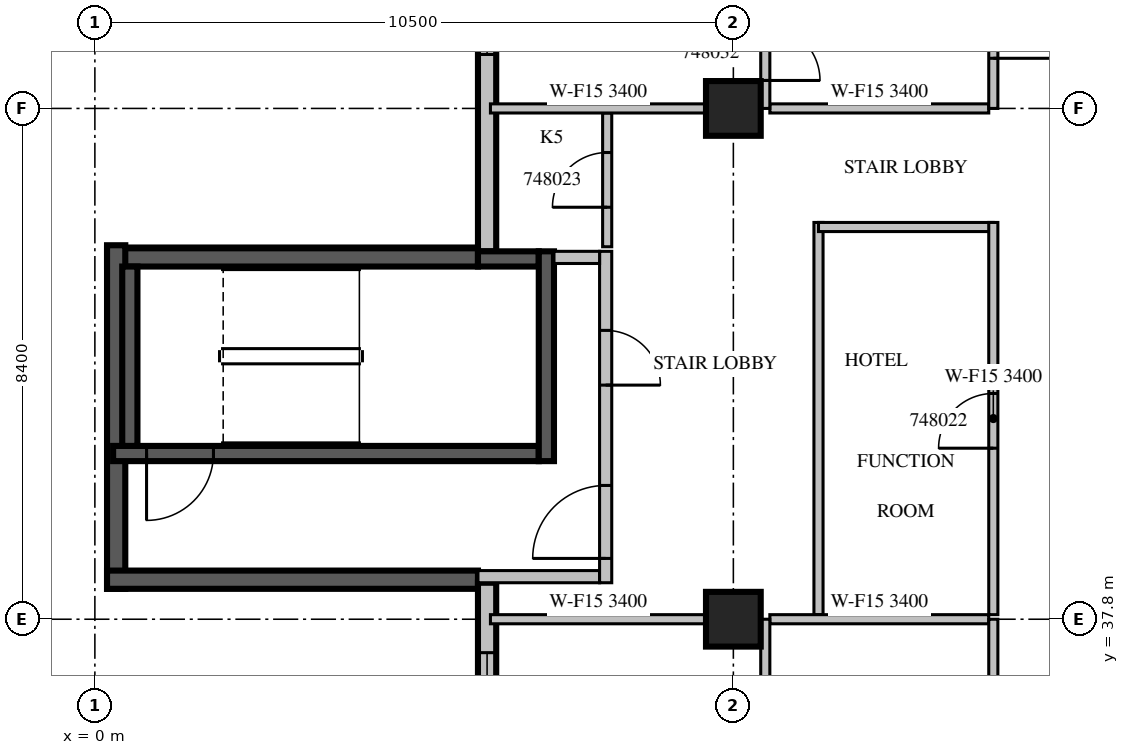
"""IFC4 building model, lengths in metres.
Left out: names, types, materials, properties, quantities, classifications, styles, units other than length and angle.
Written with IfcOpenShell. Run it as: python <this file> out.ifc"""

import sys

from ifc_helpers import new_model, si_unit, direction, frame, frame_2d, origin, origin_2d, place, context, subcontext, project, spatial, rectangle, extrude, source, transform, mapped, element, fill, save


model = new_model("IFC4")
c1 = context("Model", 3, precision=1e-05, world=origin(), true_north=direction((0.0, 1.0)))
c2 = subcontext(c1, "Body", "Model", "MODEL_VIEW")
j1 = project(units=[si_unit("LENGTHUNIT", "METRE"), si_unit("PLANEANGLEUNIT", "RADIAN")], contexts=[c1])
p1 = place(None, origin())
s1 = spatial("IfcSite", under=j1, at=p1, CompositionType="ELEMENT")
p2 = place(p1, origin())
s2 = spatial("IfcBuilding", under=s1, at=p2, CompositionType="ELEMENT")
p3 = place(p2, frame((0.0, 0.0, 215.8)))
s3 = spatial("IfcBuildingStorey", under=s2, at=p3, CompositionType="ELEMENT", Elevation=215.8)
m1 = source(origin(), c2, "Body", "SweptSolid", [
    extrude(rectangle(XDim=0.9, YDim=0.9, at=origin_2d()), origin(), (0.0, 0.0, 1.0), 3.8),
])
for number, where, z_axis, x_axis in (
    (1, (10.5, 37.8, 0.0), (0.0, 0.0, 1.0), (1.0, 0.0, 0.0)),
    (2, (10.5, 46.2, 0.0), (0.0, 0.0, 1.0), (1.0, 0.0, 0.0)),
):
    element("IfcColumn", number, at=place(p3, frame(where, z_axis=z_axis, x_axis=x_axis)), inside=s3, PredefinedType="COLUMN", context=c2, shape_type="MappedRepresentation", body=[
        mapped(m1, transform((0.0, 0.0, 0.0), scale=1.0)),
    ])
m2 = source(origin(), c2, "Body", "SweptSolid", [
    extrude(rectangle(XDim=9.91, YDim=0.3, at=frame_2d((4.955, 0.0))), origin(), (0.0, 0.0, 1.0), 3.4),
])
p4 = place(p3, frame((6.45, 53.76, 0.0), z_axis=(0.0, 0.0, 1.0), x_axis=(0.0, -1.0, 0.0)))
e3 = element("IfcWall", 3, at=p4, inside=s3, PredefinedType="STANDARD", context=c2, shape_type="MappedRepresentation", body=[
    mapped(m2, transform((0.0, 0.0, 0.0), scale=1.0)),
])
m3 = source(origin(), c2, "Body", "SweptSolid", [
    extrude(rectangle(XDim=2.4, YDim=2.3, at=frame_2d((1.2, 1.15))), frame((0.0, 0.16, 0.0), z_axis=(0.0, -1.0, 0.0), x_axis=(1.0, 0.0, 0.0)), (0.0, 0.0, 1.0), 0.32),
])
p5 = place(p4, frame((4.272, 0.0, 0.6)))
e4 = element("IfcOpeningElement", 4, at=p5, cuts=e3, PredefinedType="OPENING", context=c2, shape_type="MappedRepresentation", body=[
    mapped(m3, transform((0.0, 0.0, 0.0), scale=1.0)),
])
p6 = place(p4, frame((0.936, 0.0, 0.6)))
e5 = element("IfcOpeningElement", 5, at=p6, cuts=e3, PredefinedType="OPENING", context=c2, shape_type="MappedRepresentation", body=[
    mapped(m3, transform((0.0, 0.0, 0.0), scale=1.0)),
])
m4 = source(origin(), c2, "Body", "SweptSolid", [
    extrude(rectangle(XDim=6.1, YDim=0.3, at=frame_2d((3.05, 0.0))), origin(), (0.0, 0.0, 1.0), 3.4),
])
p7 = place(p3, frame((6.3, 43.75, 0.0), z_axis=(0.0, 0.0, 1.0), x_axis=(-1.0, 0.0, 0.0)))
e6 = element("IfcWall", 6, at=p7, inside=s3, PredefinedType="SOLIDWALL", context=c2, shape_type="MappedRepresentation", body=[
    mapped(m4, transform((0.0, 0.0, 0.0), scale=1.0)),
])
m5 = source(origin(), c2, "Body", "SweptSolid", [
    extrude(rectangle(XDim=5.65, YDim=0.3, at=frame_2d((2.825, 0.0))), origin(), (0.0, 0.0, 1.0), 3.4),
])
p8 = place(p3, frame((0.35, 43.95, 0.0), z_axis=(0.0, 0.0, 1.0), x_axis=(0.0, -1.0, 0.0)))
e7 = element("IfcWall", 7, at=p8, inside=s3, PredefinedType="SOLIDWALL", context=c2, shape_type="MappedRepresentation", body=[
    mapped(m5, transform((0.0, 0.0, 0.0), scale=1.0)),
])
p9 = place(p3, frame((0.2, 38.45, 0.0), z_axis=(0.0, 0.0, 1.0), x_axis=(1.0, 0.0, 0.0)))
e8 = element("IfcWall", 8, at=p9, inside=s3, PredefinedType="SOLIDWALL", context=c2, shape_type="MappedRepresentation", body=[
    mapped(m4, transform((0.0, 0.0, 0.0), scale=1.0)),
])
m6 = source(origin(), c2, "Body", "SweptSolid", [
    extrude(rectangle(XDim=16.6, YDim=0.3, at=frame_2d((8.3, 0.0))), origin(), (0.0, 0.0, 1.0), 2.9),
])
p10 = place(p3, frame((6.45, 38.4, 0.0), z_axis=(0.0, 0.0, 1.0), x_axis=(0.0, -1.0, 0.0)))
e9 = element("IfcWall", 9, at=p10, inside=s3, PredefinedType="STANDARD", context=c2, shape_type="MappedRepresentation", body=[
    mapped(m6, transform((0.0, 0.0, 0.0), scale=1.0)),
])
m7 = source(origin(), c2, "Body", "SweptSolid", [
    extrude(rectangle(XDim=1.8, YDim=2.3, at=frame_2d((0.9, 1.15))), frame((0.0, 0.16, 0.0), z_axis=(0.0, -1.0, 0.0), x_axis=(1.0, 0.0, 0.0)), (0.0, 0.0, 1.0), 0.32),
])
p11 = place(p10, frame((1.15, 0.0, 0.6)))
e10 = element("IfcOpeningElement", 10, at=p11, cuts=e9, PredefinedType="OPENING", context=c2, shape_type="MappedRepresentation", body=[
    mapped(m7, transform((0.0, 0.0, 0.0), scale=1.0)),
])
p12 = place(p10, frame((5.162, 0.0, 0.6)))
e11 = element("IfcOpeningElement", 11, at=p12, cuts=e9, PredefinedType="OPENING", context=c2, shape_type="MappedRepresentation", body=[
    mapped(m7, transform((0.0, 0.0, 0.0), scale=1.0)),
])
p13 = place(p10, frame((9.438, 0.0, 0.6)))
e12 = element("IfcOpeningElement", 12, at=p13, cuts=e9, PredefinedType="OPENING", context=c2, shape_type="MappedRepresentation", body=[
    mapped(m7, transform((0.0, 0.0, 0.0), scale=1.0)),
])
m8 = source(origin(), c2, "Body", "SweptSolid", [
    extrude(rectangle(XDim=1.2, YDim=2.3, at=frame_2d((0.6, 1.15))), frame((0.0, 0.16, 0.0), z_axis=(0.0, -1.0, 0.0), x_axis=(1.0, 0.0, 0.0)), (0.0, 0.0, 1.0), 0.32),
])
p14 = place(p10, frame((14.338, 0.0, 0.6)))
e13 = element("IfcOpeningElement", 13, at=p14, cuts=e9, PredefinedType="OPENING", context=c2, shape_type="MappedRepresentation", body=[
    mapped(m8, transform((0.0, 0.0, 0.0), scale=1.0)),
])
p15 = place(p10, frame((11.887, 0.0, 0.6)))
e14 = element("IfcOpeningElement", 14, at=p15, cuts=e9, PredefinedType="OPENING", context=c2, shape_type="MappedRepresentation", body=[
    mapped(m7, transform((0.0, 0.0, 0.0), scale=1.0)),
])
m9 = source(origin(), c2, "Body", "SweptSolid", [
    extrude(rectangle(XDim=7.0, YDim=0.25, at=frame_2d((3.5, 0.0))), origin(), (0.0, 0.0, 1.0), 3.4),
])
p16 = place(p3, frame((0.3, 40.525, 0.0), z_axis=(0.0, 0.0, 1.0), x_axis=(1.0, 0.0, 0.0)))
e15 = element("IfcWall", 15, at=p16, inside=s3, PredefinedType="SOLIDWALL", context=c2, shape_type="MappedRepresentation", body=[
    mapped(m9, transform((0.0, 0.0, 0.0), scale=1.0)),
])
m10 = source(origin(), c2, "Body", "SweptSolid", [
    extrude(rectangle(XDim=1.1, YDim=2.1, at=frame_2d((0.55, 1.05))), frame((0.0, 0.135, 0.0), z_axis=(0.0, -1.0, 0.0), x_axis=(1.0, 0.0, 0.0)), (0.0, 0.0, 1.0), 0.27),
])
p17 = place(p16, frame((0.55, 0.0, 0.0)))
e16 = element("IfcOpeningElement", 16, at=p17, cuts=e15, PredefinedType="OPENING", context=c2, shape_type="MappedRepresentation", body=[
    mapped(m10, transform((0.0, 0.0, 0.0), scale=1.0)),
])
m11 = source(origin(), c2, "Body", "SweptSolid", [
    extrude(rectangle(XDim=1.0, YDim=0.25, at=frame_2d((0.5, 0.0))), origin(), (0.0, 0.0, 1.0), 3.4),
])
p18 = place(p3, frame((6.3, 43.725, 0.0), z_axis=(0.0, 0.0, 1.0), x_axis=(1.0, 0.0, 0.0)))
e17 = element("IfcWall", 17, at=p18, inside=s3, PredefinedType="SOLIDWALL", context=c2, shape_type="MappedRepresentation", body=[
    mapped(m11, transform((0.0, 0.0, 0.0), scale=1.0)),
])
m12 = source(origin(), c2, "Body", "SweptSolid", [
    extrude(rectangle(XDim=3.45, YDim=0.25, at=frame_2d((1.725, 0.0))), origin(), (0.0, 0.0, 1.0), 3.4),
])
p19 = place(p3, frame((7.425, 40.4, 0.0), z_axis=(0.0, 0.0, 1.0), x_axis=(0.0, 1.0, 0.0)))
e18 = element("IfcWall", 18, at=p19, inside=s3, PredefinedType="SOLIDWALL", context=c2, shape_type="MappedRepresentation", body=[
    mapped(m12, transform((0.0, 0.0, 0.0), scale=1.0)),
])
m13 = source(origin(), c2, "Body", "SweptSolid", [
    extrude(rectangle(XDim=2.95, YDim=0.25, at=frame_2d((1.475, 0.0))), origin(), (0.0, 0.0, 1.0), 3.4),
])
p20 = place(p3, frame((0.575, 40.65, 0.0), z_axis=(0.0, 0.0, 1.0), x_axis=(0.0, 1.0, 0.0)))
e19 = element("IfcWall", 19, at=p20, inside=s3, PredefinedType="SOLIDWALL", context=c2, shape_type="MappedRepresentation", body=[
    mapped(m13, transform((0.0, 0.0, 0.0), scale=1.0)),
])
m14 = source(origin(), c2, "Body", "SweptSolid", [
    extrude(rectangle(XDim=2.0, YDim=0.2, at=frame_2d((1.0, 0.0))), origin(), (0.0, 0.0, 1.0), 3.4),
])
p21 = place(p3, frame((6.3, 38.5, 0.0), z_axis=(0.0, 0.0, 1.0), x_axis=(1.0, 0.0, 0.0)))
e20 = element("IfcWall", 20, at=p21, inside=s3, PredefinedType="PARTITIONING", context=c2, shape_type="MappedRepresentation", body=[
    mapped(m14, transform((0.0, 0.0, 0.0), scale=1.0)),
])
m15 = source(origin(), c2, "Body", "SweptSolid", [
    extrude(rectangle(XDim=5.45, YDim=0.2, at=frame_2d((2.725, 0.0))), origin(), (0.0, 0.0, 1.0), 3.4),
])
p22 = place(p3, frame((8.4, 38.4, 0.0), z_axis=(0.0, 0.0, 1.0), x_axis=(0.0, 1.0, 0.0)))
e21 = element("IfcWall", 21, at=p22, inside=s3, PredefinedType="PARTITIONING", context=c2, shape_type="MappedRepresentation", body=[
    mapped(m15, transform((0.0, 0.0, 0.0), scale=1.0)),
])
m16 = source(origin(), c2, "Body", "SweptSolid", [
    extrude(rectangle(XDim=1.2, YDim=2.1, at=frame_2d((0.6, 1.05))), frame((0.0, 0.11, 0.0), z_axis=(0.0, -1.0, 0.0), x_axis=(1.0, 0.0, 0.0)), (0.0, 0.0, 1.0), 0.22),
])
p23 = place(p22, frame((0.4, 0.0, 0.0)))
e22 = element("IfcOpeningElement", 22, at=p23, cuts=e21, PredefinedType="OPENING", context=c2, shape_type="MappedRepresentation", body=[
    mapped(m16, transform((0.0, 0.0, 0.0), scale=1.0)),
])
m17 = source(origin(), c2, "Body", "SweptSolid", [
    extrude(rectangle(XDim=0.9, YDim=2.1, at=frame_2d((0.45, 1.05))), frame((0.0, 0.11, 0.0), z_axis=(0.0, -1.0, 0.0), x_axis=(1.0, 0.0, 0.0)), (0.0, 0.0, 1.0), 0.22),
])
p24 = place(p22, frame((3.25, 0.0, 0.0)))
e23 = element("IfcOpeningElement", 23, at=p24, cuts=e21, PredefinedType="OPENING", context=c2, shape_type="MappedRepresentation", body=[
    mapped(m17, transform((0.0, 0.0, 0.0), scale=1.0)),
])
m18 = source(origin(), c2, "Body", "SweptSolid", [
    extrude(rectangle(XDim=0.75, YDim=0.2, at=frame_2d((0.375, 0.0))), origin(), (0.0, 0.0, 1.0), 3.4),
])
p25 = place(p3, frame((7.55, 43.75, 0.0), z_axis=(0.0, 0.0, 1.0), x_axis=(1.0, 0.0, 0.0)))
e24 = element("IfcWall", 24, at=p25, inside=s3, PredefinedType="PARTITIONING", context=c2, shape_type="MappedRepresentation", body=[
    mapped(m18, transform((0.0, 0.0, 0.0), scale=1.0)),
])
m19 = source(origin(), c2, "Body", "SweptSolid", [
    extrude(rectangle(XDim=6.45, YDim=0.15, at=frame_2d((3.225, 0.0))), origin(), (0.0, 0.0, 1.0), 3.4),
])
p26 = place(p3, frame((11.9, 44.325, 0.0), z_axis=(0.0, 0.0, 1.0), x_axis=(0.0, -1.0, 0.0)))
e25 = element("IfcWall", 25, at=p26, inside=s3, PredefinedType="PARTITIONING", context=c2, shape_type="MappedRepresentation", body=[
    mapped(m19, transform((0.0, 0.0, 0.0), scale=1.0)),
])
m20 = source(origin(), c2, "Body", "SweptSolid", [
    extrude(rectangle(XDim=2.875, YDim=0.15, at=frame_2d((1.438, 0.0))), origin(), (0.0, 0.0, 1.0), 3.4),
])
p27 = place(p3, frame((14.775, 44.25, 0.0), z_axis=(0.0, 0.0, 1.0), x_axis=(-1.0, 0.0, 0.0)))
e26 = element("IfcWall", 26, at=p27, inside=s3, PredefinedType="PARTITIONING", context=c2, shape_type="MappedRepresentation", body=[
    mapped(m20, transform((0.0, 0.0, 0.0), scale=1.0)),
])
p28 = place(p3, frame((14.775, 37.875, 0.0), z_axis=(0.0, 0.0, 1.0), x_axis=(0.0, 1.0, 0.0)))
e27 = element("IfcWall", 27, at=p28, inside=s3, PredefinedType="PARTITIONING", context=c2, shape_type="MappedRepresentation", body=[
    mapped(m19, transform((0.0, 0.0, 0.0), scale=1.0)),
])
m21 = source(origin(), c2, "Body", "SweptSolid", [
    extrude(rectangle(XDim=0.9, YDim=2.1, at=frame_2d((0.45, 1.05))), frame((0.0, 0.085, 0.0), z_axis=(0.0, -1.0, 0.0), x_axis=(1.0, 0.0, 0.0)), (0.0, 0.0, 1.0), 0.17),
])
p29 = place(p28, frame((2.737, 0.0, 0.0)))
e28 = element("IfcOpeningElement", 28, at=p29, cuts=e27, PredefinedType="OPENING", context=c2, shape_type="MappedRepresentation", body=[
    mapped(m21, transform((0.0, 0.0, 0.0), scale=1.0)),
])
m22 = source(origin(), c2, "Body", "SweptSolid", [
    extrude(rectangle(XDim=2.2, YDim=0.15, at=frame_2d((1.1, 0.0))), origin(), (0.0, 0.0, 1.0), 3.4),
])
p30 = place(p3, frame((8.425, 43.925, 0.0), z_axis=(0.0, 0.0, 1.0), x_axis=(0.0, 1.0, 0.0)))
e29 = element("IfcWall", 29, at=p30, inside=s3, PredefinedType="PARTITIONING", context=c2, shape_type="MappedRepresentation", body=[
    mapped(m22, transform((0.0, 0.0, 0.0), scale=1.0)),
])
p31 = place(p30, frame((0.65, 0.0, 0.0)))
e30 = element("IfcOpeningElement", 30, at=p31, cuts=e29, PredefinedType="OPENING", context=c2, shape_type="MappedRepresentation", body=[
    mapped(m21, transform((0.0, 0.0, 0.0), scale=1.0)),
])
m23 = source(origin(), c2, "Body", "SweptSolid", [
    extrude(rectangle(XDim=3.546, YDim=0.15, at=frame_2d((1.773, 0.0))), origin(), (0.0, 0.0, 1.0), 3.4),
])
p32 = place(p3, frame((10.051, 37.8, 0.0), z_axis=(0.0, 0.0, 1.0), x_axis=(-1.0, 0.0, 0.0)))
e31 = element("IfcWall", 31, at=p32, inside=s3, PredefinedType="PARTITIONING", context=c2, shape_type="MappedRepresentation", body=[
    mapped(m23, transform((0.0, 0.0, 0.0), scale=1.0)),
])
m24 = source(origin(), c2, "Body", "SweptSolid", [
    extrude(rectangle(XDim=3.6, YDim=0.15, at=frame_2d((1.8, 0.0))), origin(), (0.0, 0.0, 1.0), 3.4),
])
p33 = place(p3, frame((14.7, 37.8, 0.0), z_axis=(0.0, 0.0, 1.0), x_axis=(-1.0, 0.0, 0.0)))
e32 = element("IfcWall", 32, at=p33, inside=s3, PredefinedType="PARTITIONING", context=c2, shape_type="MappedRepresentation", body=[
    mapped(m24, transform((0.0, 0.0, 0.0), scale=1.0)),
])
m25 = source(origin(), c2, "Body", "SweptSolid", [
    extrude(rectangle(XDim=8.4, YDim=0.15, at=frame_2d((4.2, 0.0))), origin(), (0.0, 0.0, 1.0), 2.9),
])
p34 = place(p3, frame((11.025, 29.4, 0.0), z_axis=(0.0, 0.0, 1.0), x_axis=(0.0, 1.0, 0.0)))
e33 = element("IfcWall", 33, at=p34, inside=s3, PredefinedType="PARTITIONING", context=c2, shape_type="MappedRepresentation", body=[
    mapped(m25, transform((0.0, 0.0, 0.0), scale=1.0)),
])
p35 = place(p34, frame((1.418, 0.0, 0.0)))
e34 = element("IfcOpeningElement", 34, at=p35, cuts=e33, PredefinedType="OPENING", context=c2, shape_type="MappedRepresentation", body=[
    mapped(m21, transform((0.0, 0.0, 0.0), scale=1.0)),
])
p36 = place(p34, frame((0.46, 0.0, 0.0)))
e35 = element("IfcOpeningElement", 35, at=p36, cuts=e33, PredefinedType="OPENING", context=c2, shape_type="MappedRepresentation", body=[
    mapped(m21, transform((0.0, 0.0, 0.0), scale=1.0)),
])
p37 = place(p34, frame((4.525, 0.0, 0.0)))
e36 = element("IfcOpeningElement", 36, at=p37, cuts=e33, PredefinedType="OPENING", context=c2, shape_type="MappedRepresentation", body=[
    mapped(m21, transform((0.0, 0.0, 0.0), scale=1.0)),
])
p38 = place(p34, frame((6.387, 0.0, 0.0)))
e37 = element("IfcOpeningElement", 37, at=p38, cuts=e33, PredefinedType="OPENING", context=c2, shape_type="MappedRepresentation", body=[
    mapped(m21, transform((0.0, 0.0, 0.0), scale=1.0)),
])
p39 = place(p3, frame((10.051, 46.2, 0.0), z_axis=(0.0, 0.0, 1.0), x_axis=(-1.0, 0.0, 0.0)))
e38 = element("IfcWall", 38, at=p39, inside=s3, PredefinedType="PARTITIONING", context=c2, shape_type="MappedRepresentation", body=[
    mapped(m23, transform((0.0, 0.0, 0.0), scale=1.0)),
])
p40 = place(p3, frame((14.7, 46.2, 0.0), z_axis=(0.0, 0.0, 1.0), x_axis=(-1.0, 0.0, 0.0)))
e39 = element("IfcWall", 39, at=p40, inside=s3, PredefinedType="PARTITIONING", context=c2, shape_type="MappedRepresentation", body=[
    mapped(m24, transform((0.0, 0.0, 0.0), scale=1.0)),
])
m26 = source(origin(), c2, "Body", "SweptSolid", [
    extrude(rectangle(XDim=7.26, YDim=0.15, at=frame_2d((3.63, 0.0))), origin(), (0.0, 0.0, 1.0), 3.4),
])
p41 = place(p3, frame((11.025, 46.2, 0.0), z_axis=(0.0, 0.0, 1.0), x_axis=(0.0, 1.0, 0.0)))
e40 = element("IfcWall", 40, at=p41, inside=s3, PredefinedType="PARTITIONING", context=c2, shape_type="MappedRepresentation", body=[
    mapped(m26, transform((0.0, 0.0, 0.0), scale=1.0)),
])
p42 = place(p41, frame((1.412, 0.0, 0.0)))
e41 = element("IfcOpeningElement", 41, at=p42, cuts=e40, PredefinedType="OPENING", context=c2, shape_type="MappedRepresentation", body=[
    mapped(m21, transform((0.0, 0.0, 0.0), scale=1.0)),
])
p43 = place(p41, frame((0.46, 0.0, 0.0)))
e42 = element("IfcOpeningElement", 42, at=p43, cuts=e40, PredefinedType="OPENING", context=c2, shape_type="MappedRepresentation", body=[
    mapped(m21, transform((0.0, 0.0, 0.0), scale=1.0)),
])
p44 = place(p41, frame((3.901, 0.0, 0.0)))
e43 = element("IfcOpeningElement", 43, at=p44, cuts=e40, PredefinedType="OPENING", context=c2, shape_type="MappedRepresentation", body=[
    mapped(m21, transform((0.0, 0.0, 0.0), scale=1.0)),
])
p45 = place(p3, frame((14.775, 29.4, 0.0), z_axis=(0.0, 0.0, 1.0), x_axis=(0.0, 1.0, 0.0)))
e44 = element("IfcWall", 44, at=p45, inside=s3, PredefinedType="PARTITIONING", context=c2, shape_type="MappedRepresentation", body=[
    mapped(m25, transform((0.0, 0.0, 0.0), scale=1.0)),
])
m27 = source(origin(), c2, "Body", "SweptSolid", [
    extrude(rectangle(XDim=1.2, YDim=2.1, at=frame_2d((0.6, 1.05))), frame((0.0, 0.085, 0.0), z_axis=(0.0, -1.0, 0.0), x_axis=(1.0, 0.0, 0.0)), (0.0, 0.0, 1.0), 0.17),
])
p46 = place(p45, frame((1.03, 0.0, 0.0)))
e45 = element("IfcOpeningElement", 45, at=p46, cuts=e44, PredefinedType="OPENING", context=c2, shape_type="MappedRepresentation", body=[
    mapped(m27, transform((0.0, 0.0, 0.0), scale=1.0)),
])
p47 = place(p3, frame((14.775, 46.2, 0.0), z_axis=(0.0, 0.0, 1.0), x_axis=(0.0, 1.0, 0.0)))
e46 = element("IfcWall", 46, at=p47, inside=s3, PredefinedType="PARTITIONING", context=c2, shape_type="MappedRepresentation", body=[
    mapped(m26, transform((0.0, 0.0, 0.0), scale=1.0)),
])
p48 = place(p47, frame((0.825, 0.0, 0.0)))
e47 = element("IfcOpeningElement", 47, at=p48, cuts=e46, PredefinedType="OPENING", context=c2, shape_type="MappedRepresentation", body=[
    mapped(m27, transform((0.0, 0.0, 0.0), scale=1.0)),
])
m28 = source(origin(), c2, "Body", "SweptSolid", [
    extrude(rectangle(XDim=2.4, YDim=2.3, at=frame_2d((1.2, 1.15))), frame((0.0, 0.03, 0.0), z_axis=(0.0, -1.0, 0.0), x_axis=(1.0, 0.0, 0.0)), (0.0, 0.0, 1.0), 0.06),
])
p49 = place(p5, origin())
e48 = element("IfcWindow", 48, at=p49, inside=s3, PartitioningType="SINGLE_PANEL", PredefinedType="WINDOW", context=c2, shape_type="MappedRepresentation", body=[
    mapped(m28, transform((0.0, 0.0, 0.0), scale=1.0)),
])
fill(e4, e48)
m29 = source(origin(), c2, "Body", "SweptSolid", [
    extrude(rectangle(XDim=1.8, YDim=2.3, at=frame_2d((0.9, 1.15))), frame((0.0, 0.03, 0.0), z_axis=(0.0, -1.0, 0.0), x_axis=(1.0, 0.0, 0.0)), (0.0, 0.0, 1.0), 0.06),
])
p50 = place(p11, origin())
e49 = element("IfcWindow", 49, at=p50, inside=s3, PartitioningType="SINGLE_PANEL", PredefinedType="WINDOW", context=c2, shape_type="MappedRepresentation", body=[
    mapped(m29, transform((0.0, 0.0, 0.0), scale=1.0)),
])
fill(e10, e49)
m30 = source(origin(), c2, "Body", "SweptSolid", [
    extrude(rectangle(XDim=1.1, YDim=2.1, at=frame_2d((0.55, 1.05))), frame((0.0, 0.025, 0.0), z_axis=(0.0, -1.0, 0.0), x_axis=(1.0, 0.0, 0.0)), (0.0, 0.0, 1.0), 0.05),
])
p51 = place(p17, origin())
e50 = element("IfcDoor", 50, at=p51, inside=s3, OperationType="SINGLE_SWING_RIGHT", PredefinedType="DOOR", context=c2, shape_type="MappedRepresentation", body=[
    mapped(m30, transform((0.0, 0.0, 0.0), scale=1.0)),
])
fill(e16, e50)
m31 = source(origin(), c2, "Body", "SweptSolid", [
    extrude(rectangle(XDim=1.2, YDim=2.1, at=frame_2d((0.6, 1.05))), frame((0.0, 0.025, 0.0), z_axis=(0.0, -1.0, 0.0), x_axis=(1.0, 0.0, 0.0)), (0.0, 0.0, 1.0), 0.05),
])
p52 = place(p23, origin())
e51 = element("IfcDoor", 51, at=p52, inside=s3, OperationType="SINGLE_SWING_LEFT", PredefinedType="DOOR", context=c2, shape_type="MappedRepresentation", body=[
    mapped(m31, transform((0.0, 0.0, 0.0), scale=1.0)),
])
fill(e22, e51)
m32 = source(origin(), c2, "Body", "SweptSolid", [
    extrude(rectangle(XDim=0.9, YDim=2.1, at=frame_2d((0.45, 1.05))), frame((0.0, 0.025, 0.0), z_axis=(0.0, -1.0, 0.0), x_axis=(1.0, 0.0, 0.0)), (0.0, 0.0, 1.0), 0.05),
])
p53 = place(p24, origin())
e52 = element("IfcDoor", 52, at=p53, inside=s3, OperationType="SINGLE_SWING_RIGHT", PredefinedType="DOOR", context=c2, shape_type="MappedRepresentation", body=[
    mapped(m32, transform((0.0, 0.0, 0.0), scale=1.0)),
])
fill(e23, e52)
p54 = place(p29, origin())
e53 = element("IfcDoor", 53, at=p54, inside=s3, OperationType="SINGLE_SWING_LEFT", PredefinedType="DOOR", context=c2, shape_type="MappedRepresentation", body=[
    mapped(m32, transform((0.0, 0.0, 0.0), scale=1.0)),
])
fill(e28, e53)
p55 = place(p31, origin())
e54 = element("IfcDoor", 54, at=p55, inside=s3, OperationType="SINGLE_SWING_LEFT", PredefinedType="DOOR", context=c2, shape_type="MappedRepresentation", body=[
    mapped(m32, transform((0.0, 0.0, 0.0), scale=1.0)),
])
fill(e30, e54)
p56 = place(p48, origin())
e55 = element("IfcDoor", 55, at=p56, inside=s3, OperationType="SINGLE_SWING_RIGHT", PredefinedType="DOOR", context=c2, shape_type="MappedRepresentation", body=[
    mapped(m31, transform((0.0, 0.0, 0.0), scale=1.0)),
])
fill(e47, e55)
p57 = place(p43, origin())
e56 = element("IfcDoor", 56, at=p57, inside=s3, OperationType="SINGLE_SWING_RIGHT", PredefinedType="DOOR", context=c2, shape_type="MappedRepresentation", body=[
    mapped(m32, transform((0.0, 0.0, 0.0), scale=1.0)),
])
fill(e42, e56)
save(model, sys.argv[1])
